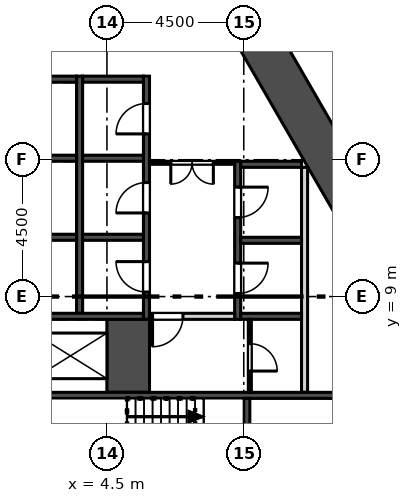
"""IFC4 building model, lengths in metres.
Left out: names, types, materials, properties, quantities, classifications, styles, units other than length and angle.
Written with IfcOpenShell. Run it as: python <this file> out.ifc"""

import sys

from ifc_helpers import new_model, si_unit, direction, frame, frame_2d, origin, place, context, subcontext, project, spatial, rectangle, extrude, element, fill, save


model = new_model("IFC4")
c1 = context("Model", 3, precision=1e-05, world=origin(), true_north=direction((0.0, 1.0)))
c2 = subcontext(c1, "Body", "Model", "MODEL_VIEW")
j1 = project(units=[si_unit("LENGTHUNIT", "METRE"), si_unit("PLANEANGLEUNIT", "RADIAN")], contexts=[c1])
p1 = place(None, origin())
s1 = spatial("IfcSite", under=j1, at=p1, CompositionType="ELEMENT")
p2 = place(p1, origin())
s2 = spatial("IfcBuilding", under=s1, at=p2, CompositionType="ELEMENT")
p3 = place(p2, frame((0.0, 0.0, 14.0)))
s3 = spatial("IfcBuildingStorey", under=s2, at=p3, CompositionType="ELEMENT", Elevation=14.0)
p4 = place(p3, frame((13.394, 10.703, 0.0), z_axis=(0.0, 0.0, 1.0), x_axis=(-0.50000187635, 0.866024320471, 0.0)))
e1 = element("IfcWall", 1, at=p4, inside=s3, PredefinedType="SHEAR", context=c2, shape_type="SweptSolid", body=[
    extrude(rectangle(XDim=9.177, YDim=1.4, at=frame_2d((4.588, 0.0))), origin(), (0.0, 0.0, 1.0), 6.0),
])
p5 = place(p3, frame((42.853, 8.575, 0.0), z_axis=(0.0, 0.0, 1.0), x_axis=(-0.49999894854, 0.866026010844, 0.0)))
e2 = element("IfcWall", 2, at=p5, inside=s3, PredefinedType="SOLIDWALL", context=c2, shape_type="SweptSolid", body=[
    extrude(rectangle(XDim=76.0, YDim=0.34, at=frame_2d((38.0, 0.0))), origin(), (0.0, 0.0, 1.0), 5.7),
])
p6 = place(p5, frame((1.058, 0.0, 0.9)))
e3 = element("IfcOpeningElement", 3, at=p6, cuts=e2, PredefinedType="OPENING", context=c2, shape_type="SweptSolid", body=[
    extrude(rectangle(XDim=1.885, YDim=3.5, at=frame_2d((0.942, 1.75))), frame((0.0, 0.18, 0.0), z_axis=(0.0, -1.0, 0.0), x_axis=(1.0, 0.0, 0.0)), (0.0, 0.0, 1.0), 0.36),
])
p7 = place(p5, frame((4.058, 0.0, 0.9)))
e4 = element("IfcOpeningElement", 4, at=p7, cuts=e2, PredefinedType="OPENING", context=c2, shape_type="SweptSolid", body=[
    extrude(rectangle(XDim=1.885, YDim=3.5, at=frame_2d((0.942, 1.75))), frame((0.0, 0.18, 0.0), z_axis=(0.0, -1.0, 0.0), x_axis=(1.0, 0.0, 0.0)), (0.0, 0.0, 1.0), 0.36),
])
p8 = place(p5, frame((7.058, 0.0, 0.9)))
e5 = element("IfcOpeningElement", 5, at=p8, cuts=e2, PredefinedType="OPENING", context=c2, shape_type="SweptSolid", body=[
    extrude(rectangle(XDim=1.885, YDim=3.5, at=frame_2d((0.942, 1.75))), frame((0.0, 0.18, 0.0), z_axis=(0.0, -1.0, 0.0), x_axis=(1.0, 0.0, 0.0)), (0.0, 0.0, 1.0), 0.36),
])
p9 = place(p5, frame((10.058, 0.0, 0.9)))
e6 = element("IfcOpeningElement", 6, at=p9, cuts=e2, PredefinedType="OPENING", context=c2, shape_type="SweptSolid", body=[
    extrude(rectangle(XDim=1.885, YDim=3.5, at=frame_2d((0.942, 1.75))), frame((0.0, 0.18, 0.0), z_axis=(0.0, -1.0, 0.0), x_axis=(1.0, 0.0, 0.0)), (0.0, 0.0, 1.0), 0.36),
])
p10 = place(p5, frame((13.058, 0.0, 0.9)))
e7 = element("IfcOpeningElement", 7, at=p10, cuts=e2, PredefinedType="OPENING", context=c2, shape_type="SweptSolid", body=[
    extrude(rectangle(XDim=1.885, YDim=3.5, at=frame_2d((0.942, 1.75))), frame((0.0, 0.18, 0.0), z_axis=(0.0, -1.0, 0.0), x_axis=(1.0, 0.0, 0.0)), (0.0, 0.0, 1.0), 0.36),
])
p11 = place(p5, frame((16.058, 0.0, 0.9)))
e8 = element("IfcOpeningElement", 8, at=p11, cuts=e2, PredefinedType="OPENING", context=c2, shape_type="SweptSolid", body=[
    extrude(rectangle(XDim=1.885, YDim=3.5, at=frame_2d((0.942, 1.75))), frame((0.0, 0.18, 0.0), z_axis=(0.0, -1.0, 0.0), x_axis=(1.0, 0.0, 0.0)), (0.0, 0.0, 1.0), 0.36),
])
p12 = place(p5, frame((19.058, 0.0, 0.9)))
e9 = element("IfcOpeningElement", 9, at=p12, cuts=e2, PredefinedType="OPENING", context=c2, shape_type="SweptSolid", body=[
    extrude(rectangle(XDim=1.885, YDim=3.5, at=frame_2d((0.942, 1.75))), frame((0.0, 0.18, 0.0), z_axis=(0.0, -1.0, 0.0), x_axis=(1.0, 0.0, 0.0)), (0.0, 0.0, 1.0), 0.36),
])
p13 = place(p5, frame((22.058, 0.0, 0.9)))
e10 = element("IfcOpeningElement", 10, at=p13, cuts=e2, PredefinedType="OPENING", context=c2, shape_type="SweptSolid", body=[
    extrude(rectangle(XDim=1.885, YDim=3.5, at=frame_2d((0.942, 1.75))), frame((0.0, 0.18, 0.0), z_axis=(0.0, -1.0, 0.0), x_axis=(1.0, 0.0, 0.0)), (0.0, 0.0, 1.0), 0.36),
])
p14 = place(p5, frame((25.058, 0.0, 0.9)))
e11 = element("IfcOpeningElement", 11, at=p14, cuts=e2, PredefinedType="OPENING", context=c2, shape_type="SweptSolid", body=[
    extrude(rectangle(XDim=1.885, YDim=3.5, at=frame_2d((0.942, 1.75))), frame((0.0, 0.18, 0.0), z_axis=(0.0, -1.0, 0.0), x_axis=(1.0, 0.0, 0.0)), (0.0, 0.0, 1.0), 0.36),
])
p15 = place(p5, frame((28.058, 0.0, 0.9)))
e12 = element("IfcOpeningElement", 12, at=p15, cuts=e2, PredefinedType="OPENING", context=c2, shape_type="SweptSolid", body=[
    extrude(rectangle(XDim=1.885, YDim=3.5, at=frame_2d((0.942, 1.75))), frame((0.0, 0.18, 0.0), z_axis=(0.0, -1.0, 0.0), x_axis=(1.0, 0.0, 0.0)), (0.0, 0.0, 1.0), 0.36),
])
p16 = place(p5, frame((31.058, 0.0, 0.9)))
e13 = element("IfcOpeningElement", 13, at=p16, cuts=e2, PredefinedType="OPENING", context=c2, shape_type="SweptSolid", body=[
    extrude(rectangle(XDim=1.885, YDim=3.5, at=frame_2d((0.942, 1.75))), frame((0.0, 0.18, 0.0), z_axis=(0.0, -1.0, 0.0), x_axis=(1.0, 0.0, 0.0)), (0.0, 0.0, 1.0), 0.36),
])
p17 = place(p5, frame((34.058, 0.0, 0.9)))
e14 = element("IfcOpeningElement", 14, at=p17, cuts=e2, PredefinedType="OPENING", context=c2, shape_type="SweptSolid", body=[
    extrude(rectangle(XDim=1.885, YDim=3.5, at=frame_2d((0.942, 1.75))), frame((0.0, 0.18, 0.0), z_axis=(0.0, -1.0, 0.0), x_axis=(1.0, 0.0, 0.0)), (0.0, 0.0, 1.0), 0.36),
])
p18 = place(p5, frame((37.058, 0.0, 0.9)))
e15 = element("IfcOpeningElement", 15, at=p18, cuts=e2, PredefinedType="OPENING", context=c2, shape_type="SweptSolid", body=[
    extrude(rectangle(XDim=1.885, YDim=3.5, at=frame_2d((0.942, 1.75))), frame((0.0, 0.18, 0.0), z_axis=(0.0, -1.0, 0.0), x_axis=(1.0, 0.0, 0.0)), (0.0, 0.0, 1.0), 0.36),
])
p19 = place(p5, frame((40.058, 0.0, 0.9)))
e16 = element("IfcOpeningElement", 16, at=p19, cuts=e2, PredefinedType="OPENING", context=c2, shape_type="SweptSolid", body=[
    extrude(rectangle(XDim=1.885, YDim=3.5, at=frame_2d((0.942, 1.75))), frame((0.0, 0.18, 0.0), z_axis=(0.0, -1.0, 0.0), x_axis=(1.0, 0.0, 0.0)), (0.0, 0.0, 1.0), 0.36),
])
p20 = place(p5, frame((43.058, 0.0, 0.9)))
e17 = element("IfcOpeningElement", 17, at=p20, cuts=e2, PredefinedType="OPENING", context=c2, shape_type="SweptSolid", body=[
    extrude(rectangle(XDim=1.885, YDim=3.5, at=frame_2d((0.942, 1.75))), frame((0.0, 0.18, 0.0), z_axis=(0.0, -1.0, 0.0), x_axis=(1.0, 0.0, 0.0)), (0.0, 0.0, 1.0), 0.36),
])
p21 = place(p5, frame((46.058, 0.0, 0.9)))
e18 = element("IfcOpeningElement", 18, at=p21, cuts=e2, PredefinedType="OPENING", context=c2, shape_type="SweptSolid", body=[
    extrude(rectangle(XDim=1.885, YDim=3.5, at=frame_2d((0.942, 1.75))), frame((0.0, 0.18, 0.0), z_axis=(0.0, -1.0, 0.0), x_axis=(1.0, 0.0, 0.0)), (0.0, 0.0, 1.0), 0.36),
])
p22 = place(p5, frame((49.058, 0.0, 0.9)))
e19 = element("IfcOpeningElement", 19, at=p22, cuts=e2, PredefinedType="OPENING", context=c2, shape_type="SweptSolid", body=[
    extrude(rectangle(XDim=1.885, YDim=3.5, at=frame_2d((0.942, 1.75))), frame((0.0, 0.18, 0.0), z_axis=(0.0, -1.0, 0.0), x_axis=(1.0, 0.0, 0.0)), (0.0, 0.0, 1.0), 0.36),
])
p23 = place(p5, frame((52.058, 0.0, 0.9)))
e20 = element("IfcOpeningElement", 20, at=p23, cuts=e2, PredefinedType="OPENING", context=c2, shape_type="SweptSolid", body=[
    extrude(rectangle(XDim=1.885, YDim=3.5, at=frame_2d((0.942, 1.75))), frame((0.0, 0.18, 0.0), z_axis=(0.0, -1.0, 0.0), x_axis=(1.0, 0.0, 0.0)), (0.0, 0.0, 1.0), 0.36),
])
p24 = place(p5, frame((55.058, 0.0, 0.9)))
e21 = element("IfcOpeningElement", 21, at=p24, cuts=e2, PredefinedType="OPENING", context=c2, shape_type="SweptSolid", body=[
    extrude(rectangle(XDim=1.885, YDim=3.5, at=frame_2d((0.942, 1.75))), frame((0.0, 0.18, 0.0), z_axis=(0.0, -1.0, 0.0), x_axis=(1.0, 0.0, 0.0)), (0.0, 0.0, 1.0), 0.36),
])
p25 = place(p5, frame((58.058, 0.0, 0.9)))
e22 = element("IfcOpeningElement", 22, at=p25, cuts=e2, PredefinedType="OPENING", context=c2, shape_type="SweptSolid", body=[
    extrude(rectangle(XDim=1.885, YDim=3.5, at=frame_2d((0.942, 1.75))), frame((0.0, 0.18, 0.0), z_axis=(0.0, -1.0, 0.0), x_axis=(1.0, 0.0, 0.0)), (0.0, 0.0, 1.0), 0.36),
])
p26 = place(p5, frame((61.058, 0.0, 0.9)))
e23 = element("IfcOpeningElement", 23, at=p26, cuts=e2, PredefinedType="OPENING", context=c2, shape_type="SweptSolid", body=[
    extrude(rectangle(XDim=1.885, YDim=3.5, at=frame_2d((0.942, 1.75))), frame((0.0, 0.18, 0.0), z_axis=(0.0, -1.0, 0.0), x_axis=(1.0, 0.0, 0.0)), (0.0, 0.0, 1.0), 0.36),
])
p27 = place(p5, frame((64.058, 0.0, 0.9)))
e24 = element("IfcOpeningElement", 24, at=p27, cuts=e2, PredefinedType="OPENING", context=c2, shape_type="SweptSolid", body=[
    extrude(rectangle(XDim=1.885, YDim=3.5, at=frame_2d((0.942, 1.75))), frame((0.0, 0.18, 0.0), z_axis=(0.0, -1.0, 0.0), x_axis=(1.0, 0.0, 0.0)), (0.0, 0.0, 1.0), 0.36),
])
p28 = place(p5, frame((67.058, 0.0, 0.9)))
e25 = element("IfcOpeningElement", 25, at=p28, cuts=e2, PredefinedType="OPENING", context=c2, shape_type="SweptSolid", body=[
    extrude(rectangle(XDim=1.885, YDim=3.5, at=frame_2d((0.942, 1.75))), frame((0.0, 0.18, 0.0), z_axis=(0.0, -1.0, 0.0), x_axis=(1.0, 0.0, 0.0)), (0.0, 0.0, 1.0), 0.36),
])
p29 = place(p5, frame((70.058, 0.0, 0.9)))
e26 = element("IfcOpeningElement", 26, at=p29, cuts=e2, PredefinedType="OPENING", context=c2, shape_type="SweptSolid", body=[
    extrude(rectangle(XDim=1.885, YDim=3.5, at=frame_2d((0.942, 1.75))), frame((0.0, 0.18, 0.0), z_axis=(0.0, -1.0, 0.0), x_axis=(1.0, 0.0, 0.0)), (0.0, 0.0, 1.0), 0.36),
])
p30 = place(p5, frame((73.058, 0.0, 0.9)))
e27 = element("IfcOpeningElement", 27, at=p30, cuts=e2, PredefinedType="OPENING", context=c2, shape_type="SweptSolid", body=[
    extrude(rectangle(XDim=1.885, YDim=3.5, at=frame_2d((0.942, 1.75))), frame((0.0, 0.18, 0.0), z_axis=(0.0, -1.0, 0.0), x_axis=(1.0, 0.0, 0.0)), (0.0, 0.0, 1.0), 0.36),
])
p31 = place(p3, frame((11.0, 5.85, 0.0), z_axis=(0.0, 0.0, 1.0), x_axis=(0.0, 1.0, 0.0)))
e28 = element("IfcWall", 28, at=p31, inside=s3, PredefinedType="SOLIDWALL", context=c2, shape_type="SweptSolid", body=[
    extrude(rectangle(XDim=7.4, YDim=0.2, at=frame_2d((3.7, 0.0))), origin(), (0.0, 0.0, 1.0), 5.7),
])
p32 = place(p3, frame((8.8, 8.25, -0.3), z_axis=(0.0, 0.0, 1.0), x_axis=(0.0, 1.0, 0.0)))
e29 = element("IfcWall", 29, at=p32, inside=s3, PredefinedType="SOLIDWALL", context=c2, shape_type="SweptSolid", body=[
    extrude(rectangle(XDim=5.2, YDim=0.2, at=frame_2d((2.6, 0.0))), origin(), (0.0, 0.0, 1.0), 6.0),
])
p33 = place(p32, frame((0.85, 0.0, 0.3)))
e30 = element("IfcOpeningElement", 30, at=p33, cuts=e29, PredefinedType="OPENING", context=c2, shape_type="SweptSolid", body=[
    extrude(rectangle(XDim=1.0, YDim=2.1, at=frame_2d((0.5, 1.05))), frame((0.0, 0.11, 0.0), z_axis=(0.0, -1.0, 0.0), x_axis=(1.0, 0.0, 0.0)), (0.0, 0.0, 1.0), 0.22),
])
p34 = place(p32, frame((3.35, 0.0, 0.3)))
e31 = element("IfcOpeningElement", 31, at=p34, cuts=e29, PredefinedType="OPENING", context=c2, shape_type="SweptSolid", body=[
    extrude(rectangle(XDim=1.0, YDim=2.1, at=frame_2d((0.5, 1.05))), frame((0.0, 0.11, 0.0), z_axis=(0.0, -1.0, 0.0), x_axis=(1.0, 0.0, 0.0)), (0.0, 0.0, 1.0), 0.22),
])
p35 = place(p3, frame((5.8, 8.25, -0.3), z_axis=(0.0, 0.0, 1.0), x_axis=(0.0, 1.0, 0.0)))
e32 = element("IfcWall", 32, at=p35, inside=s3, PredefinedType="SOLIDWALL", context=c2, shape_type="SweptSolid", body=[
    extrude(rectangle(XDim=8.0, YDim=0.2, at=frame_2d((4.0, 0.0))), origin(), (0.0, 0.0, 1.0), 6.0),
])
p36 = place(p35, frame((0.9, 0.0, 0.3)))
e33 = element("IfcOpeningElement", 33, at=p36, cuts=e32, PredefinedType="OPENING", context=c2, shape_type="SweptSolid", body=[
    extrude(rectangle(XDim=1.0, YDim=2.1, at=frame_2d((0.5, 1.05))), frame((0.0, 0.11, 0.0), z_axis=(0.0, -1.0, 0.0), x_axis=(1.0, 0.0, 0.0)), (0.0, 0.0, 1.0), 0.22),
])
p37 = place(p35, frame((3.5, 0.0, 0.3)))
e34 = element("IfcOpeningElement", 34, at=p37, cuts=e32, PredefinedType="OPENING", context=c2, shape_type="SweptSolid", body=[
    extrude(rectangle(XDim=1.0, YDim=2.1, at=frame_2d((0.5, 1.05))), frame((0.0, 0.11, 0.0), z_axis=(0.0, -1.0, 0.0), x_axis=(1.0, 0.0, 0.0)), (0.0, 0.0, 1.0), 0.22),
])
p38 = place(p35, frame((6.1, 0.0, 0.3)))
e35 = element("IfcOpeningElement", 35, at=p38, cuts=e32, PredefinedType="OPENING", context=c2, shape_type="SweptSolid", body=[
    extrude(rectangle(XDim=1.0, YDim=2.1, at=frame_2d((0.5, 1.05))), frame((0.0, 0.11, 0.0), z_axis=(0.0, -1.0, 0.0), x_axis=(1.0, 0.0, 0.0)), (0.0, 0.0, 1.0), 0.22),
])
p39 = place(p3, frame((3.6, 8.45, -0.3), z_axis=(0.0, 0.0, 1.0), x_axis=(0.0, 1.0, 0.0)))
e36 = element("IfcWall", 36, at=p39, inside=s3, PredefinedType="SOLIDWALL", context=c2, shape_type="SweptSolid", body=[
    extrude(rectangle(XDim=7.8, YDim=0.2, at=frame_2d((3.9, 0.0))), origin(), (0.0, 0.0, 1.0), 6.0),
])
p40 = place(p3, frame((5.2, 5.85, -0.3), z_axis=(0.0, 0.0, 1.0), x_axis=(0.0, 1.0, 0.0)))
e37 = element("IfcWall", 37, at=p40, inside=s3, PredefinedType="SOLIDWALL", context=c2, shape_type="SweptSolid", body=[
    extrude(rectangle(XDim=2.4, YDim=1.4, at=frame_2d((1.2, 0.0))), origin(), (0.0, 0.0, 1.0), 6.0),
])
p41 = place(p3, frame((8.9, 8.35, -0.3), z_axis=(0.0, 0.0, 1.0), x_axis=(1.0, 0.0, 0.0)))
e38 = element("IfcWall", 38, at=p41, inside=s3, PredefinedType="SOLIDWALL", context=c2, shape_type="SweptSolid", body=[
    extrude(rectangle(XDim=2.0, YDim=0.2, at=frame_2d((1.0, 0.0))), origin(), (0.0, 0.0, 1.0), 6.0),
])
p42 = place(p3, frame((1.5, 8.35, -0.3), z_axis=(0.0, 0.0, 1.0), x_axis=(1.0, 0.0, 0.0)))
e39 = element("IfcWall", 39, at=p42, inside=s3, PredefinedType="SOLIDWALL", context=c2, shape_type="SweptSolid", body=[
    extrude(rectangle(XDim=4.2, YDim=0.2, at=frame_2d((2.1, 0.0))), origin(), (0.0, 0.0, 1.0), 6.0),
])
p43 = place(p3, frame((1.2, 5.75, -0.3), z_axis=(0.0, 0.0, 1.0), x_axis=(1.0, 0.0, 0.0)))
e40 = element("IfcWall", 40, at=p43, inside=s3, PredefinedType="SOLIDWALL", context=c2, shape_type="SweptSolid", body=[
    extrude(rectangle(XDim=11.4, YDim=0.2, at=frame_2d((5.7, 0.0))), origin(), (0.0, 0.0, 1.0), 6.0),
])
p44 = place(p3, frame((9.1, 2.25, -0.3), z_axis=(0.0, 0.0, 1.0), x_axis=(0.0, 1.0, 0.0)))
e41 = element("IfcWall", 41, at=p44, inside=s3, PredefinedType="SOLIDWALL", context=c2, shape_type="SweptSolid", body=[
    extrude(rectangle(XDim=3.4, YDim=0.2, at=frame_2d((1.7, 0.0))), origin(), (0.0, 0.0, 1.0), 6.0),
])
p45 = place(p44, frame((0.2, 0.0, 0.3)))
e42 = element("IfcOpeningElement", 42, at=p45, cuts=e41, PredefinedType="OPENING", context=c2, shape_type="SweptSolid", body=[
    extrude(rectangle(XDim=1.2, YDim=2.1, at=frame_2d((0.6, 1.05))), frame((0.0, 0.11, 0.0), z_axis=(0.0, -1.0, 0.0), x_axis=(1.0, 0.0, 0.0)), (0.0, 0.0, 1.0), 0.22),
])
for number, where, z_axis, x_axis in (
    (43, (8.9, 10.85, -0.3), (0.0, 0.0, 1.0), (1.0, 0.0, 0.0)),
    (44, (8.9, 13.35, -0.3), (0.0, 0.0, 1.0), (1.0, 0.0, 0.0)),
    (45, (3.7, 10.95, -0.3), (0.0, 0.0, 1.0), (1.0, 0.0, 0.0)),
    (46, (3.7, 13.55, -0.3), (0.0, 0.0, 1.0), (1.0, 0.0, 0.0)),
    (47, (3.7, 16.15, -0.3), (0.0, 0.0, 1.0), (1.0, 0.0, 0.0)),
    (48, (1.5, 10.95, -0.3), (0.0, 0.0, 1.0), (1.0, 0.0, 0.0)),
    (49, (1.5, 13.55, -0.3), (0.0, 0.0, 1.0), (1.0, 0.0, 0.0)),
    (50, (1.5, 16.15, -0.3), (0.0, 0.0, 1.0), (1.0, 0.0, 0.0)),
):
    element("IfcWall", number, at=place(p3, frame(where, z_axis=z_axis, x_axis=x_axis)), inside=s3, PredefinedType="SOLIDWALL", context=c2, shape_type="SweptSolid", body=[
        extrude(rectangle(XDim=2.0, YDim=0.2, at=frame_2d((1.0, 0.0))), origin(), (0.0, 0.0, 1.0), 6.0),
    ])
p46 = place(p3, frame((5.9, 13.4, 0.0), z_axis=(0.0, 0.0, 1.0), x_axis=(1.0, 0.0, 0.0)))
e51 = element("IfcWall", 51, at=p46, inside=s3, PredefinedType="PARTITIONING", context=c2, shape_type="SweptSolid", body=[
    extrude(rectangle(XDim=2.8, YDim=0.1, at=frame_2d((1.4, 0.0))), origin(), (0.0, 0.0, 1.0), 5.7),
])
p47 = place(p46, frame((0.7, 0.0, 0.0)))
e52 = element("IfcOpeningElement", 52, at=p47, cuts=e51, PredefinedType="OPENING", context=c2, shape_type="SweptSolid", body=[
    extrude(rectangle(XDim=1.4, YDim=2.1, at=frame_2d((0.7, 1.05))), frame((0.0, 0.06, 0.0), z_axis=(0.0, -1.0, 0.0), x_axis=(1.0, 0.0, 0.0)), (0.0, 0.0, 1.0), 0.12),
])
p48 = place(p3, frame((9.2, 5.85, 0.0), z_axis=(0.0, 0.0, 1.0), x_axis=(0.0, 1.0, 0.0)))
e53 = element("IfcWall", 53, at=p48, inside=s3, PredefinedType="PARTITIONING", context=c2, shape_type="SweptSolid", body=[
    extrude(rectangle(XDim=2.4, YDim=0.1, at=frame_2d((1.2, 0.0))), origin(), (0.0, 0.0, 1.0), 5.7),
])
p49 = place(p48, frame((0.7, 0.0, 0.0)))
e54 = element("IfcOpeningElement", 54, at=p49, cuts=e53, PredefinedType="OPENING", context=c2, shape_type="SweptSolid", body=[
    extrude(rectangle(XDim=0.9, YDim=2.1, at=frame_2d((0.45, 1.05))), frame((0.0, 0.06, 0.0), z_axis=(0.0, -1.0, 0.0), x_axis=(1.0, 0.0, 0.0)), (0.0, 0.0, 1.0), 0.12),
])
p50 = place(p3, frame((5.9, 8.35, 0.0), z_axis=(0.0, 0.0, 1.0), x_axis=(1.0, 0.0, 0.0)))
e55 = element("IfcWall", 55, at=p50, inside=s3, PredefinedType="SOLIDWALL", context=c2, shape_type="SweptSolid", body=[
    extrude(rectangle(XDim=2.8, YDim=0.2, at=frame_2d((1.4, 0.0))), origin(), (0.0, 0.0, 1.0), 5.7),
])
p51 = place(p50, frame((0.1, 0.0, 0.0)))
e56 = element("IfcOpeningElement", 56, at=p51, cuts=e55, PredefinedType="OPENING", context=c2, shape_type="SweptSolid", body=[
    extrude(rectangle(XDim=1.0, YDim=2.1, at=frame_2d((0.5, 1.05))), frame((0.0, 0.11, 0.0), z_axis=(0.0, -1.0, 0.0), x_axis=(1.0, 0.0, 0.0)), (0.0, 0.0, 1.0), 0.22),
])
p52 = place(p33, frame((1.0, 0.0, 0.0), z_axis=(0.0, 0.0, 1.0), x_axis=(-1.0, 0.0, 0.0)))
e57 = element("IfcDoor", 57, at=p52, inside=s3, OperationType="SINGLE_SWING_LEFT", PredefinedType="DOOR", context=c2, shape_type="SweptSolid", body=[
    extrude(rectangle(XDim=1.0, YDim=2.1, at=frame_2d((0.5, 1.05))), frame((0.0, 0.025, 0.0), z_axis=(0.0, -1.0, 0.0), x_axis=(1.0, 0.0, 0.0)), (0.0, 0.0, 1.0), 0.05),
])
fill(e30, e57)
p53 = place(p34, frame((1.0, 0.0, 0.0), z_axis=(0.0, 0.0, 1.0), x_axis=(-1.0, 0.0, 0.0)))
e58 = element("IfcDoor", 58, at=p53, inside=s3, OperationType="SINGLE_SWING_LEFT", PredefinedType="DOOR", context=c2, shape_type="SweptSolid", body=[
    extrude(rectangle(XDim=1.0, YDim=2.1, at=frame_2d((0.5, 1.05))), frame((0.0, 0.025, 0.0), z_axis=(0.0, -1.0, 0.0), x_axis=(1.0, 0.0, 0.0)), (0.0, 0.0, 1.0), 0.05),
])
fill(e31, e58)
p54 = place(p36, origin())
e59 = element("IfcDoor", 59, at=p54, inside=s3, OperationType="SINGLE_SWING_RIGHT", PredefinedType="DOOR", context=c2, shape_type="SweptSolid", body=[
    extrude(rectangle(XDim=1.0, YDim=2.1, at=frame_2d((0.5, 1.05))), frame((0.0, 0.025, 0.0), z_axis=(0.0, -1.0, 0.0), x_axis=(1.0, 0.0, 0.0)), (0.0, 0.0, 1.0), 0.05),
])
fill(e33, e59)
p55 = place(p37, origin())
e60 = element("IfcDoor", 60, at=p55, inside=s3, OperationType="SINGLE_SWING_LEFT", PredefinedType="DOOR", context=c2, shape_type="SweptSolid", body=[
    extrude(rectangle(XDim=1.0, YDim=2.1, at=frame_2d((0.5, 1.05))), frame((0.0, 0.025, 0.0), z_axis=(0.0, -1.0, 0.0), x_axis=(1.0, 0.0, 0.0)), (0.0, 0.0, 1.0), 0.05),
])
fill(e34, e60)
p56 = place(p38, origin())
e61 = element("IfcDoor", 61, at=p56, inside=s3, OperationType="SINGLE_SWING_LEFT", PredefinedType="DOOR", context=c2, shape_type="SweptSolid", body=[
    extrude(rectangle(XDim=1.0, YDim=2.1, at=frame_2d((0.5, 1.05))), frame((0.0, 0.025, 0.0), z_axis=(0.0, -1.0, 0.0), x_axis=(1.0, 0.0, 0.0)), (0.0, 0.0, 1.0), 0.05),
])
fill(e35, e61)
p57 = place(p47, frame((1.4, 0.0, 0.0), z_axis=(0.0, 0.0, 1.0), x_axis=(-1.0, 0.0, 0.0)))
e62 = element("IfcDoor", 62, at=p57, inside=s3, OperationType="DOUBLE_DOOR_SINGLE_SWING", PredefinedType="DOOR", context=c2, shape_type="SweptSolid", body=[
    extrude(rectangle(XDim=1.4, YDim=2.1, at=frame_2d((0.7, 1.05))), frame((0.0, 0.025, 0.0), z_axis=(0.0, -1.0, 0.0), x_axis=(1.0, 0.0, 0.0)), (0.0, 0.0, 1.0), 0.05),
])
fill(e52, e62)
p58 = place(p51, frame((1.0, 0.0, 0.0), z_axis=(0.0, 0.0, 1.0), x_axis=(-1.0, 0.0, 0.0)))
e63 = element("IfcDoor", 63, at=p58, inside=s3, OperationType="SINGLE_SWING_RIGHT", PredefinedType="DOOR", context=c2, shape_type="SweptSolid", body=[
    extrude(rectangle(XDim=1.0, YDim=2.1, at=frame_2d((0.5, 1.05))), frame((0.0, 0.025, 0.0), z_axis=(0.0, -1.0, 0.0), x_axis=(1.0, 0.0, 0.0)), (0.0, 0.0, 1.0), 0.05),
])
fill(e56, e63)
p59 = place(p49, frame((0.9, 0.0, 0.0), z_axis=(0.0, 0.0, 1.0), x_axis=(-1.0, 0.0, 0.0)))
e64 = element("IfcDoor", 64, at=p59, inside=s3, OperationType="SINGLE_SWING_RIGHT", PredefinedType="DOOR", context=c2, shape_type="SweptSolid", body=[
    extrude(rectangle(XDim=0.9, YDim=2.1, at=frame_2d((0.45, 1.05))), frame((0.0, 0.025, 0.0), z_axis=(0.0, -1.0, 0.0), x_axis=(1.0, 0.0, 0.0)), (0.0, 0.0, 1.0), 0.05),
])
fill(e54, e64)
save(model, sys.argv[1])
